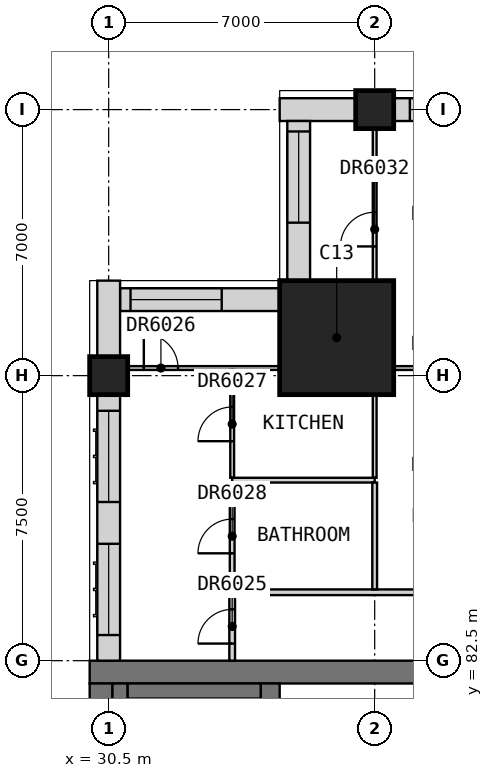
"""IFC4 building model, lengths in metres.
Left out: names, types, materials, properties, quantities, classifications, styles, units other than length and angle.
Written with IfcOpenShell. Run it as: python <this file> out.ifc"""

import sys

from ifc_helpers import new_model, si_unit, direction, frame, frame_2d, origin, origin_2d, place, context, subcontext, project, spatial, rectangle, extrude, element, fill, save


model = new_model("IFC4")
c1 = context("Model", 3, precision=1e-05, world=origin(), true_north=direction((0.0, 1.0)))
c2 = subcontext(c1, "Body", "Model", "MODEL_VIEW")
j1 = project(units=[si_unit("LENGTHUNIT", "METRE"), si_unit("PLANEANGLEUNIT", "RADIAN")], contexts=[c1])
p1 = place(None, origin())
s1 = spatial("IfcSite", under=j1, at=p1, CompositionType="ELEMENT")
p2 = place(p1, origin())
s2 = spatial("IfcBuilding", under=s1, at=p2, CompositionType="ELEMENT")
p3 = place(p2, frame((0.0, 0.0, 254.7)))
s3 = spatial("IfcBuildingStorey", under=s2, at=p3, CompositionType="ELEMENT", Elevation=254.7)
for number, where, z_axis, x_axis in (
    (1, (30.5, 90.0, 0.0), (0.0, 0.0, 1.0), (1.0, 0.0, 0.0)),
    (2, (37.5, 97.0, 0.0), (0.0, 0.0, 1.0), (1.0, 0.0, 0.0)),
):
    element("IfcColumn", number, at=place(p3, frame(where, z_axis=z_axis, x_axis=x_axis)), inside=s3, PredefinedType="COLUMN", context=c2, shape_type="SweptSolid", body=[
        extrude(rectangle(XDim=1.0, YDim=1.0, at=origin_2d()), origin(), (0.0, 0.0, 1.0), 3.5),
    ])
p4 = place(p3, frame((36.5, 91.0, 0.0), z_axis=(0.0, 0.0, 1.0), x_axis=(1.0, 0.0, 0.0)))
e3 = element("IfcColumn", 3, at=p4, inside=s3, PredefinedType="COLUMN", context=c2, shape_type="SweptSolid", body=[
    extrude(rectangle(XDim=3.0, YDim=3.0, at=origin_2d()), origin(), (0.0, 0.0, 1.0), 3.5),
])
p5 = place(p3, frame((30.0, 82.2, 0.0), z_axis=(0.0, 0.0, 1.0), x_axis=(1.0, 0.0, 0.0)))
e4 = element("IfcWall", 4, at=p5, inside=s3, PredefinedType="SHEAR", context=c2, shape_type="SweptSolid", body=[
    extrude(rectangle(XDim=30.0, YDim=0.6, at=frame_2d((15.0, 0.0))), origin(), (0.0, 0.0, 1.0), 3.5),
])
p6 = place(p3, frame((30.3, 60.6, 0.0), z_axis=(0.0, 0.0, 1.0), x_axis=(0.0, 1.0, 0.0)))
e5 = element("IfcWall", 5, at=p6, inside=s3, PredefinedType="SHEAR", context=c2, shape_type="SweptSolid", body=[
    extrude(rectangle(XDim=21.3, YDim=0.6, at=frame_2d((10.65, 0.0))), origin(), (0.0, 0.0, 1.0), 3.5),
])
p7 = place(p3, frame((34.75, 78.3, 0.0), z_axis=(0.0, 0.0, 1.0), x_axis=(0.0, 1.0, 0.0)))
e6 = element("IfcWall", 6, at=p7, inside=s3, PredefinedType="SHEAR", context=c2, shape_type="SweptSolid", body=[
    extrude(rectangle(XDim=3.6, YDim=0.5, at=frame_2d((1.8, 0.0))), origin(), (0.0, 0.0, 1.0), 3.5),
])
p8 = place(p3, frame((44.5, 97.0, 0.0), z_axis=(0.0, 0.0, 1.0), x_axis=(-1.0, 0.0, 0.0)))
e7 = element("IfcWall", 7, at=p8, inside=s3, PredefinedType="SOLIDWALL", context=c2, shape_type="SweptSolid", body=[
    extrude(rectangle(XDim=6.5, YDim=0.6, at=frame_2d((3.25, 0.0))), origin(), (0.0, 0.0, 1.0), 2.75),
])
p9 = place(p8, frame((3.675, 0.0, 0.8)))
e8 = element("IfcOpeningElement", 8, at=p9, cuts=e7, PredefinedType="OPENING", context=c2, shape_type="SweptSolid", body=[
    extrude(rectangle(XDim=2.4, YDim=1.8, at=frame_2d((1.2, 0.9))), frame((0.0, 0.31, 0.0), z_axis=(0.0, -1.0, 0.0), x_axis=(1.0, 0.0, 0.0)), (0.0, 0.0, 1.0), 0.62),
])
p10 = place(p8, frame((0.425, 0.0, 0.8)))
e9 = element("IfcOpeningElement", 9, at=p10, cuts=e7, PredefinedType="OPENING", context=c2, shape_type="SweptSolid", body=[
    extrude(rectangle(XDim=2.4, YDim=1.8, at=frame_2d((1.2, 0.9))), frame((0.0, 0.31, 0.0), z_axis=(0.0, -1.0, 0.0), x_axis=(1.0, 0.0, 0.0)), (0.0, 0.0, 1.0), 0.62),
])
p11 = place(p3, frame((37.0, 97.0, 0.0), z_axis=(0.0, 0.0, 1.0), x_axis=(-1.0, 0.0, 0.0)))
e10 = element("IfcWall", 10, at=p11, inside=s3, PredefinedType="SOLIDWALL", context=c2, shape_type="SweptSolid", body=[
    extrude(rectangle(XDim=2.0, YDim=0.6, at=frame_2d((1.0, 0.0))), origin(), (0.0, 0.0, 1.0), 3.1),
])
p12 = place(p3, frame((35.5, 96.7, 0.0), z_axis=(0.0, 0.0, 1.0), x_axis=(0.0, -1.0, 0.0)))
e11 = element("IfcWall", 11, at=p12, inside=s3, PredefinedType="SOLIDWALL", context=c2, shape_type="SweptSolid", body=[
    extrude(rectangle(XDim=4.2, YDim=0.6, at=frame_2d((2.1, 0.0))), origin(), (0.0, 0.0, 1.0), 3.1),
])
p13 = place(p12, frame((0.275, 0.0, 0.8)))
e12 = element("IfcOpeningElement", 12, at=p13, cuts=e11, PredefinedType="OPENING", context=c2, shape_type="SweptSolid", body=[
    extrude(rectangle(XDim=2.4, YDim=1.8, at=frame_2d((1.2, 0.9))), frame((0.0, 0.31, 0.0), z_axis=(0.0, -1.0, 0.0), x_axis=(1.0, 0.0, 0.0)), (0.0, 0.0, 1.0), 0.62),
])
p14 = place(p3, frame((35.0, 92.0, 0.0), z_axis=(0.0, 0.0, 1.0), x_axis=(-1.0, 0.0, 0.0)))
e13 = element("IfcWall", 13, at=p14, inside=s3, PredefinedType="SOLIDWALL", context=c2, shape_type="SweptSolid", body=[
    extrude(rectangle(XDim=4.2, YDim=0.6, at=frame_2d((2.1, 0.0))), origin(), (0.0, 0.0, 1.0), 3.1),
])
p15 = place(p14, frame((1.525, 0.0, 0.8)))
e14 = element("IfcOpeningElement", 14, at=p15, cuts=e13, PredefinedType="OPENING", context=c2, shape_type="SweptSolid", body=[
    extrude(rectangle(XDim=2.4, YDim=1.8, at=frame_2d((1.2, 0.9))), frame((0.0, 0.31, 0.0), z_axis=(0.0, -1.0, 0.0), x_axis=(1.0, 0.0, 0.0)), (0.0, 0.0, 1.0), 0.62),
])
p16 = place(p3, frame((30.5, 92.5, 0.0), z_axis=(0.0, 0.0, 1.0), x_axis=(0.0, -1.0, 0.0)))
e15 = element("IfcWall", 15, at=p16, inside=s3, PredefinedType="SOLIDWALL", context=c2, shape_type="SweptSolid", body=[
    extrude(rectangle(XDim=2.0, YDim=0.6, at=frame_2d((1.0, 0.0))), origin(), (0.0, 0.0, 1.0), 3.1),
])
p17 = place(p3, frame((30.5, 89.5, 0.0), z_axis=(0.0, 0.0, 1.0), x_axis=(0.0, -1.0, 0.0)))
e16 = element("IfcWall", 16, at=p17, inside=s3, PredefinedType="SOLIDWALL", context=c2, shape_type="SweptSolid", body=[
    extrude(rectangle(XDim=7.0, YDim=0.6, at=frame_2d((3.5, 0.0))), origin(), (0.0, 0.0, 1.0), 3.1),
])
p18 = place(p17, frame((3.925, 0.0, 0.8)))
e17 = element("IfcOpeningElement", 17, at=p18, cuts=e16, PredefinedType="OPENING", context=c2, shape_type="SweptSolid", body=[
    extrude(rectangle(XDim=2.4, YDim=1.8, at=frame_2d((1.2, 0.9))), frame((0.0, 0.31, 0.0), z_axis=(0.0, -1.0, 0.0), x_axis=(1.0, 0.0, 0.0)), (0.0, 0.0, 1.0), 0.62),
])
p19 = place(p17, frame((0.425, 0.0, 0.8)))
e18 = element("IfcOpeningElement", 18, at=p19, cuts=e16, PredefinedType="OPENING", context=c2, shape_type="SweptSolid", body=[
    extrude(rectangle(XDim=2.4, YDim=1.8, at=frame_2d((1.2, 0.9))), frame((0.0, 0.31, 0.0), z_axis=(0.0, -1.0, 0.0), x_axis=(1.0, 0.0, 0.0)), (0.0, 0.0, 1.0), 0.62),
])
p20 = place(p3, frame((30.8, 60.6, 0.0), z_axis=(0.0, 0.0, 1.0), x_axis=(0.0, 1.0, 0.0)))
e19 = element("IfcWall", 19, at=p20, inside=s3, PredefinedType="SOLIDWALL", context=c2, shape_type="SweptSolid", body=[
    extrude(rectangle(XDim=21.3, YDim=0.4, at=frame_2d((10.65, 0.0))), origin(), (0.0, 0.0, 1.0), 3.09),
])
p21 = place(p3, frame((31.0, 81.7, 0.0), z_axis=(0.0, 0.0, 1.0), x_axis=(1.0, 0.0, 0.0)))
e20 = element("IfcWall", 20, at=p21, inside=s3, PredefinedType="SOLIDWALL", context=c2, shape_type="SweptSolid", body=[
    extrude(rectangle(XDim=3.5, YDim=0.4, at=frame_2d((1.75, 0.0))), origin(), (0.0, 0.0, 1.0), 3.09),
])
p22 = place(p3, frame((33.75, 84.3, 0.0), z_axis=(0.0, 0.0, 1.0), x_axis=(1.0, 0.0, 0.0)))
e21 = element("IfcWall", 21, at=p22, inside=s3, PredefinedType="PARTITIONING", context=c2, shape_type="SweptSolid", body=[
    extrude(rectangle(XDim=28.05, YDim=0.15, at=frame_2d((14.025, 0.0))), origin(), (0.0, 0.0, 1.0), 3.1),
])
p23 = place(p22, frame((12.675, 0.0, 0.0)))
e22 = element("IfcOpeningElement", 22, at=p23, cuts=e21, PredefinedType="OPENING", context=c2, shape_type="SweptSolid", body=[
    extrude(rectangle(XDim=0.9, YDim=2.1, at=frame_2d((0.45, 1.05))), frame((0.0, 0.085, 0.0), z_axis=(0.0, -1.0, 0.0), x_axis=(1.0, 0.0, 0.0)), (0.0, 0.0, 1.0), 0.17),
])
p24 = place(p22, frame((20.175, 0.0, 0.0)))
e23 = element("IfcOpeningElement", 23, at=p24, cuts=e21, PredefinedType="OPENING", context=c2, shape_type="SweptSolid", body=[
    extrude(rectangle(XDim=0.9, YDim=2.1, at=frame_2d((0.45, 1.05))), frame((0.0, 0.085, 0.0), z_axis=(0.0, -1.0, 0.0), x_axis=(1.0, 0.0, 0.0)), (0.0, 0.0, 1.0), 0.17),
])
p25 = place(p22, frame((26.65, 0.0, 0.0)))
e24 = element("IfcOpeningElement", 24, at=p25, cuts=e21, PredefinedType="OPENING", context=c2, shape_type="SweptSolid", body=[
    extrude(rectangle(XDim=1.0, YDim=2.1, at=frame_2d((0.5, 1.05))), frame((0.0, 0.085, 0.0), z_axis=(0.0, -1.0, 0.0), x_axis=(1.0, 0.0, 0.0)), (0.0, 0.0, 1.0), 0.17),
])
p26 = place(p3, frame((33.75, 82.5, 0.0), z_axis=(0.0, 0.0, 1.0), x_axis=(0.0, 1.0, 0.0)))
e25 = element("IfcWall", 25, at=p26, inside=s3, PredefinedType="PARTITIONING", context=c2, shape_type="SweptSolid", body=[
    extrude(rectangle(XDim=1.725, YDim=0.15, at=frame_2d((0.863, 0.0))), origin(), (0.0, 0.0, 1.0), 3.1),
])
p27 = place(p26, frame((0.45, 0.0, 0.0)))
e26 = element("IfcOpeningElement", 26, at=p27, cuts=e25, PredefinedType="OPENING", context=c2, shape_type="SweptSolid", body=[
    extrude(rectangle(XDim=0.9, YDim=2.1, at=frame_2d((0.45, 1.05))), frame((0.0, 0.085, 0.0), z_axis=(0.0, -1.0, 0.0), x_axis=(1.0, 0.0, 0.0)), (0.0, 0.0, 1.0), 0.17),
])
p28 = place(p3, frame((30.0, 90.2, 0.0), z_axis=(0.0, 0.0, 1.0), x_axis=(1.0, 0.0, 0.0)))
e27 = element("IfcWall", 27, at=p28, inside=s3, PredefinedType="PARTITIONING", context=c2, shape_type="SweptSolid", body=[
    extrude(rectangle(XDim=29.9, YDim=0.1, at=frame_2d((14.95, 0.0))), origin(), (0.0, 0.0, 1.0), 2.75),
])
p29 = place(p28, frame((1.425, 0.0, 0.0)))
e28 = element("IfcOpeningElement", 28, at=p29, cuts=e27, PredefinedType="OPENING", context=c2, shape_type="SweptSolid", body=[
    extrude(rectangle(XDim=0.9, YDim=2.1, at=frame_2d((0.45, 1.05))), frame((0.0, 0.06, 0.0), z_axis=(0.0, -1.0, 0.0), x_axis=(1.0, 0.0, 0.0)), (0.0, 0.0, 1.0), 0.12),
])
p30 = place(p28, frame((8.925, 0.0, 0.0)))
e29 = element("IfcOpeningElement", 29, at=p30, cuts=e27, PredefinedType="OPENING", context=c2, shape_type="SweptSolid", body=[
    extrude(rectangle(XDim=0.9, YDim=2.1, at=frame_2d((0.45, 1.05))), frame((0.0, 0.06, 0.0), z_axis=(0.0, -1.0, 0.0), x_axis=(1.0, 0.0, 0.0)), (0.0, 0.0, 1.0), 0.12),
])
p31 = place(p28, frame((12.675, 0.0, 0.0)))
e30 = element("IfcOpeningElement", 30, at=p31, cuts=e27, PredefinedType="OPENING", context=c2, shape_type="SweptSolid", body=[
    extrude(rectangle(XDim=0.9, YDim=2.1, at=frame_2d((0.45, 1.05))), frame((0.0, 0.06, 0.0), z_axis=(0.0, -1.0, 0.0), x_axis=(1.0, 0.0, 0.0)), (0.0, 0.0, 1.0), 0.12),
])
p32 = place(p28, frame((16.425, 0.0, 0.0)))
e31 = element("IfcOpeningElement", 31, at=p32, cuts=e27, PredefinedType="OPENING", context=c2, shape_type="SweptSolid", body=[
    extrude(rectangle(XDim=0.9, YDim=2.1, at=frame_2d((0.45, 1.05))), frame((0.0, 0.06, 0.0), z_axis=(0.0, -1.0, 0.0), x_axis=(1.0, 0.0, 0.0)), (0.0, 0.0, 1.0), 0.12),
])
p33 = place(p28, frame((23.925, 0.0, 0.0)))
e32 = element("IfcOpeningElement", 32, at=p33, cuts=e27, PredefinedType="OPENING", context=c2, shape_type="SweptSolid", body=[
    extrude(rectangle(XDim=0.9, YDim=2.1, at=frame_2d((0.45, 1.05))), frame((0.0, 0.06, 0.0), z_axis=(0.0, -1.0, 0.0), x_axis=(1.0, 0.0, 0.0)), (0.0, 0.0, 1.0), 0.12),
])
p34 = place(p3, frame((33.75, 87.312, 0.0), z_axis=(0.0, 0.0, 1.0), x_axis=(0.0, 1.0, 0.0)))
e33 = element("IfcWall", 33, at=p34, inside=s3, PredefinedType="PARTITIONING", context=c2, shape_type="SweptSolid", body=[
    extrude(rectangle(XDim=2.837, YDim=0.1, at=frame_2d((1.419, 0.0))), origin(), (0.0, 0.0, 1.0), 3.1),
])
p35 = place(p34, frame((0.962, 0.0, 0.0)))
e34 = element("IfcOpeningElement", 34, at=p35, cuts=e33, PredefinedType="OPENING", context=c2, shape_type="SweptSolid", body=[
    extrude(rectangle(XDim=0.9, YDim=2.1, at=frame_2d((0.45, 1.05))), frame((0.0, 0.06, 0.0), z_axis=(0.0, -1.0, 0.0), x_axis=(1.0, 0.0, 0.0)), (0.0, 0.0, 1.0), 0.12),
])
p36 = place(p3, frame((37.5, 87.312, 0.0), z_axis=(0.0, 0.0, 1.0), x_axis=(0.0, 1.0, 0.0)))
e35 = element("IfcWall", 35, at=p36, inside=s3, PredefinedType="PARTITIONING", context=c2, shape_type="SweptSolid", body=[
    extrude(rectangle(XDim=10.188, YDim=0.1, at=frame_2d((5.094, 0.0))), origin(), (0.0, 0.0, 1.0), 2.75),
])
p37 = place(p36, frame((6.087, 0.0, 0.0)))
e36 = element("IfcOpeningElement", 36, at=p37, cuts=e35, PredefinedType="OPENING", context=c2, shape_type="SweptSolid", body=[
    extrude(rectangle(XDim=0.9, YDim=2.1, at=frame_2d((0.45, 1.05))), frame((0.0, 0.06, 0.0), z_axis=(0.0, -1.0, 0.0), x_axis=(1.0, 0.0, 0.0)), (0.0, 0.0, 1.0), 0.12),
])
p38 = place(p3, frame((33.75, 87.25, 0.0), z_axis=(0.0, 0.0, 1.0), x_axis=(1.0, 0.0, 0.0)))
e37 = element("IfcWall", 37, at=p38, inside=s3, PredefinedType="PARTITIONING", context=c2, shape_type="SweptSolid", body=[
    extrude(rectangle(XDim=3.75, YDim=0.125, at=frame_2d((1.875, 0.0))), origin(), (0.0, 0.0, 1.0), 3.1),
])
p39 = place(p3, frame((33.75, 84.375, 0.0), z_axis=(0.0, 0.0, 1.0), x_axis=(0.0, 1.0, 0.0)))
e38 = element("IfcWall", 38, at=p39, inside=s3, PredefinedType="PARTITIONING", context=c2, shape_type="SweptSolid", body=[
    extrude(rectangle(XDim=2.812, YDim=0.125, at=frame_2d((1.406, 0.0))), origin(), (0.0, 0.0, 1.0), 3.1),
])
p40 = place(p39, frame((0.95, 0.0, 0.0)))
e39 = element("IfcOpeningElement", 39, at=p40, cuts=e38, PredefinedType="OPENING", context=c2, shape_type="SweptSolid", body=[
    extrude(rectangle(XDim=0.9, YDim=2.1, at=frame_2d((0.45, 1.05))), frame((0.0, 0.073, 0.0), z_axis=(0.0, -1.0, 0.0), x_axis=(1.0, 0.0, 0.0)), (0.0, 0.0, 1.0), 0.145),
])
p41 = place(p3, frame((37.5, 84.375, 0.0), z_axis=(0.0, 0.0, 1.0), x_axis=(0.0, 1.0, 0.0)))
e40 = element("IfcWall", 40, at=p41, inside=s3, PredefinedType="PARTITIONING", context=c2, shape_type="SweptSolid", body=[
    extrude(rectangle(XDim=2.812, YDim=0.125, at=frame_2d((1.406, 0.0))), origin(), (0.0, 0.0, 1.0), 3.1),
])
p42 = place(p9, origin())
e41 = element("IfcWindow", 41, at=p42, inside=s3, PartitioningType="SINGLE_PANEL", PredefinedType="WINDOW", context=c2, shape_type="SweptSolid", body=[
    extrude(rectangle(XDim=2.4, YDim=1.8, at=frame_2d((1.2, 0.9))), frame((0.0, -0.07, 0.0), z_axis=(0.0, -1.0, 0.0), x_axis=(1.0, 0.0, 0.0)), (0.0, 0.0, 1.0), 0.06),
])
fill(e8, e41)
p43 = place(p13, origin())
e42 = element("IfcWindow", 42, at=p43, inside=s3, PartitioningType="SINGLE_PANEL", PredefinedType="WINDOW", context=c2, shape_type="SweptSolid", body=[
    extrude(rectangle(XDim=2.4, YDim=1.8, at=frame_2d((1.2, 0.9))), frame((0.0, -0.07, 0.0), z_axis=(0.0, -1.0, 0.0), x_axis=(1.0, 0.0, 0.0)), (0.0, 0.0, 1.0), 0.06),
])
fill(e12, e42)
p44 = place(p15, origin())
e43 = element("IfcWindow", 43, at=p44, inside=s3, PartitioningType="SINGLE_PANEL", PredefinedType="WINDOW", context=c2, shape_type="SweptSolid", body=[
    extrude(rectangle(XDim=2.4, YDim=1.8, at=frame_2d((1.2, 0.9))), frame((0.0, -0.07, 0.0), z_axis=(0.0, -1.0, 0.0), x_axis=(1.0, 0.0, 0.0)), (0.0, 0.0, 1.0), 0.06),
])
fill(e14, e43)
p45 = place(p18, origin())
e44 = element("IfcWindow", 44, at=p45, inside=s3, PartitioningType="SINGLE_PANEL", PredefinedType="WINDOW", context=c2, shape_type="SweptSolid", body=[
    extrude(rectangle(XDim=2.4, YDim=1.8, at=frame_2d((1.2, 0.9))), frame((0.0, -0.07, 0.0), z_axis=(0.0, -1.0, 0.0), x_axis=(1.0, 0.0, 0.0)), (0.0, 0.0, 1.0), 0.06),
])
fill(e17, e44)
p46 = place(p19, origin())
e45 = element("IfcWindow", 45, at=p46, inside=s3, PartitioningType="SINGLE_PANEL", PredefinedType="WINDOW", context=c2, shape_type="SweptSolid", body=[
    extrude(rectangle(XDim=2.4, YDim=1.8, at=frame_2d((1.2, 0.9))), frame((0.0, -0.07, 0.0), z_axis=(0.0, -1.0, 0.0), x_axis=(1.0, 0.0, 0.0)), (0.0, 0.0, 1.0), 0.06),
])
fill(e18, e45)
p47 = place(p27, origin())
e46 = element("IfcDoor", 46, at=p47, inside=s3, OperationType="SINGLE_SWING_LEFT", PredefinedType="DOOR", context=c2, shape_type="SweptSolid", body=[
    extrude(rectangle(XDim=0.9, YDim=2.1, at=frame_2d((0.45, 1.05))), frame((0.0, 0.025, 0.0), z_axis=(0.0, -1.0, 0.0), x_axis=(1.0, 0.0, 0.0)), (0.0, 0.0, 1.0), 0.05),
])
fill(e26, e46)
p48 = place(p29, origin())
e47 = element("IfcDoor", 47, at=p48, inside=s3, OperationType="SINGLE_SWING_RIGHT", PredefinedType="DOOR", context=c2, shape_type="SweptSolid", body=[
    extrude(rectangle(XDim=0.9, YDim=2.1, at=frame_2d((0.45, 1.05))), frame((0.0, 0.025, 0.0), z_axis=(0.0, -1.0, 0.0), x_axis=(1.0, 0.0, 0.0)), (0.0, 0.0, 1.0), 0.05),
])
fill(e28, e47)
p49 = place(p35, origin())
e48 = element("IfcDoor", 48, at=p49, inside=s3, OperationType="SINGLE_SWING_RIGHT", PredefinedType="DOOR", context=c2, shape_type="SweptSolid", body=[
    extrude(rectangle(XDim=0.9, YDim=2.1, at=frame_2d((0.45, 1.05))), frame((0.0, 0.025, 0.0), z_axis=(0.0, -1.0, 0.0), x_axis=(1.0, 0.0, 0.0)), (0.0, 0.0, 1.0), 0.05),
])
fill(e34, e48)
p50 = place(p40, origin())
e49 = element("IfcDoor", 49, at=p50, inside=s3, OperationType="SINGLE_SWING_RIGHT", PredefinedType="DOOR", context=c2, shape_type="SweptSolid", body=[
    extrude(rectangle(XDim=0.9, YDim=2.1, at=frame_2d((0.45, 1.05))), frame((0.0, 0.025, 0.0), z_axis=(0.0, -1.0, 0.0), x_axis=(1.0, 0.0, 0.0)), (0.0, 0.0, 1.0), 0.05),
])
fill(e39, e49)
p51 = place(p37, origin())
e50 = element("IfcDoor", 50, at=p51, inside=s3, OperationType="SINGLE_SWING_LEFT", PredefinedType="DOOR", context=c2, shape_type="SweptSolid", body=[
    extrude(rectangle(XDim=0.9, YDim=2.1, at=frame_2d((0.45, 1.05))), frame((0.0, 0.025, 0.0), z_axis=(0.0, -1.0, 0.0), x_axis=(1.0, 0.0, 0.0)), (0.0, 0.0, 1.0), 0.05),
])
fill(e36, e50)
save(model, sys.argv[1])
